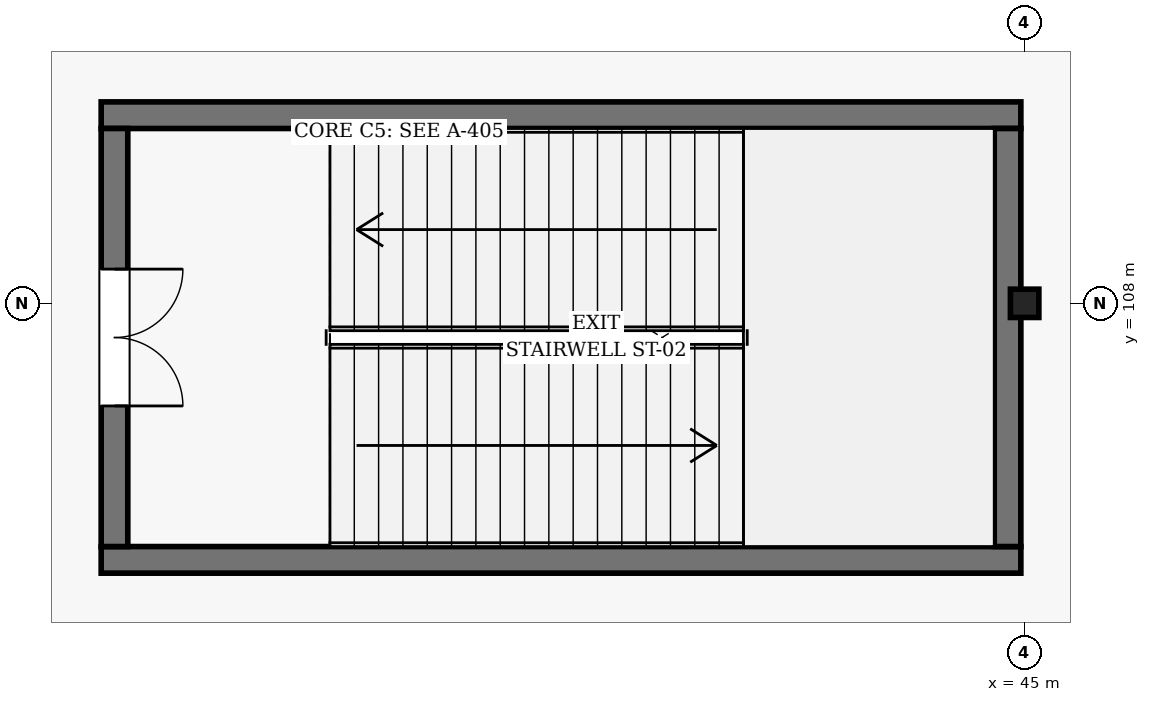
"""IFC4 building model, lengths in metres.
Left out: names, types, materials, properties, quantities, classifications, styles, units other than length and angle.
Written with IfcOpenShell. Run it as: python <this file> out.ifc"""

import sys

from ifc_helpers import new_model, si_unit, direction, frame, frame_2d, origin, origin_2d, place, context, subcontext, project, spatial, rectangle, i_section, extrude, element, fill, save


model = new_model("IFC4")
c1 = context("Model", 3, precision=1e-05, world=origin(), true_north=direction((0.0, 1.0)))
c2 = subcontext(c1, "Body", "Model", "MODEL_VIEW")
j1 = project(units=[si_unit("LENGTHUNIT", "METRE"), si_unit("PLANEANGLEUNIT", "RADIAN")], contexts=[c1])
p1 = place(None, origin())
s1 = spatial("IfcSite", under=j1, at=p1, CompositionType="ELEMENT")
p2 = place(p1, origin())
s2 = spatial("IfcBuilding", under=s1, at=p2, CompositionType="ELEMENT")
p3 = place(p2, origin())
s3 = spatial("IfcBuildingStorey", under=s2, at=p3, CompositionType="ELEMENT", Elevation=0.0)
p4 = place(p3, frame((45.0, 108.0, 0.0), z_axis=(0.0, 0.0, 1.0), x_axis=(1.0, 0.0, 0.0)))
e1 = element("IfcColumn", 1, at=p4, inside=s3, PredefinedType="COLUMN", context=c2, shape_type="SweptSolid", body=[
    extrude(i_section(OverallWidth=0.374, OverallDepth=0.372, WebThickness=0.016, FlangeThickness=0.026, FilletRadius=0.016, at=origin_2d()), origin(), (0.0, 0.0, 1.0), 5.4),
])
for number, where, z_axis, x_axis in (
    (2, (32.85, 104.625, 0.0), (0.0, 0.0, 1.0), (1.0, 0.0, 0.0)),
    (3, (44.95, 110.475, 0.0), (0.0, 0.0, 1.0), (-1.0, 0.0, 0.0)),
):
    element("IfcWall", number, at=place(p3, frame(where, z_axis=z_axis, x_axis=x_axis)), inside=s3, PredefinedType="SHEAR", context=c2, shape_type="SweptSolid", body=[
        extrude(rectangle(XDim=12.1, YDim=0.35, at=frame_2d((6.05, 0.0))), origin(), (0.0, 0.0, 1.0), 5.18),
    ])
p5 = place(p3, frame((33.025, 110.3, 0.0), z_axis=(0.0, 0.0, 1.0), x_axis=(0.0, -1.0, 0.0)))
e4 = element("IfcWall", 4, at=p5, inside=s3, PredefinedType="SHEAR", context=c2, shape_type="SweptSolid", body=[
    extrude(rectangle(XDim=5.5, YDim=0.35, at=frame_2d((2.75, 0.0))), origin(), (0.0, 0.0, 1.0), 5.18),
])
p6 = place(p5, frame((1.85, 0.0, 0.0)))
e5 = element("IfcOpeningElement", 5, at=p6, cuts=e4, PredefinedType="OPENING", context=c2, shape_type="SweptSolid", body=[
    extrude(rectangle(XDim=1.8, YDim=2.2, at=frame_2d((0.9, 1.1))), frame((0.0, 0.185, 0.0), z_axis=(0.0, -1.0, 0.0), x_axis=(1.0, 0.0, 0.0)), (0.0, 0.0, 1.0), 0.37),
])
p7 = place(p3, frame((44.775, 104.8, 0.0), z_axis=(0.0, 0.0, 1.0), x_axis=(0.0, 1.0, 0.0)))
e6 = element("IfcWall", 6, at=p7, inside=s3, PredefinedType="SHEAR", context=c2, shape_type="SweptSolid", body=[
    extrude(rectangle(XDim=5.5, YDim=0.35, at=frame_2d((2.75, 0.0))), origin(), (0.0, 0.0, 1.0), 5.18),
])
p8 = place(p6, origin())
e7 = element("IfcDoor", 7, at=p8, inside=s3, OperationType="DOUBLE_DOOR_SINGLE_SWING", PredefinedType="DOOR", context=c2, shape_type="SweptSolid", body=[
    extrude(rectangle(XDim=1.8, YDim=2.2, at=frame_2d((0.9, 1.1))), frame((0.0, 0.025, 0.0), z_axis=(0.0, -1.0, 0.0), x_axis=(1.0, 0.0, 0.0)), (0.0, 0.0, 1.0), 0.05),
])
fill(e5, e7)
save(model, sys.argv[1])
